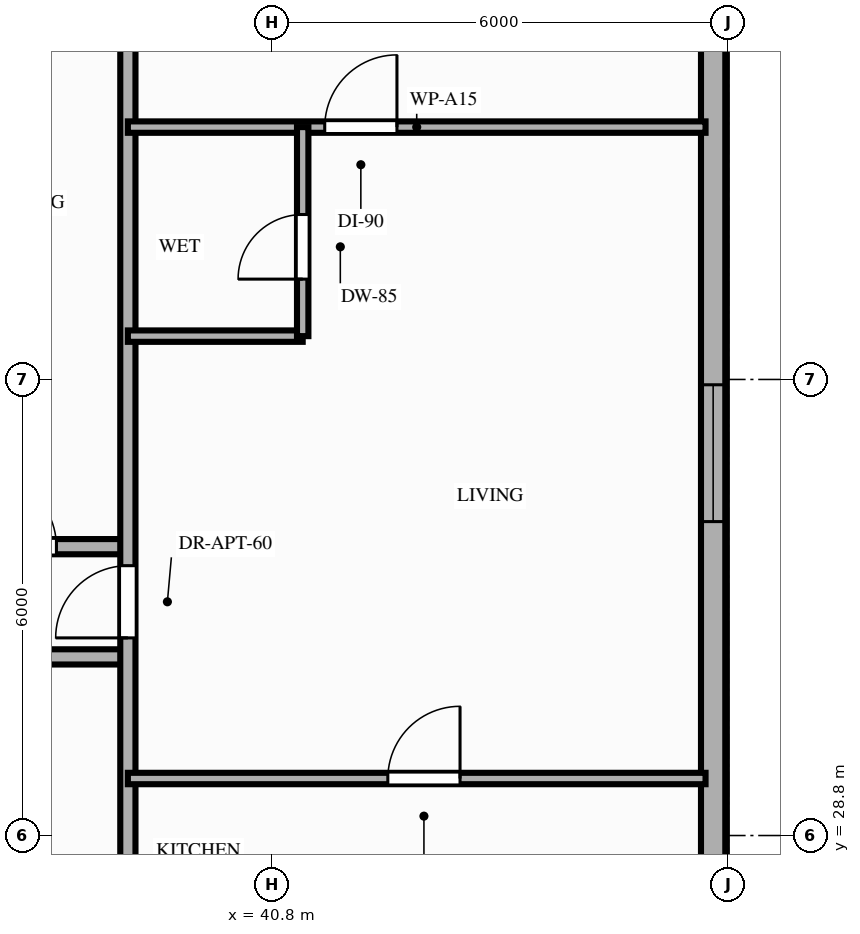
"""IFC4 building model, lengths in metres.
Left out: names, types, materials, properties, quantities, classifications, styles, units other than length and angle.
Written with IfcOpenShell. Run it as: python <this file> out.ifc"""

import sys

from ifc_helpers import new_model, si_unit, direction, frame, frame_2d, origin, place, context, subcontext, project, spatial, rectangle, extrude, element, fill, save


model = new_model("IFC4")
c1 = context("Model", 3, precision=1e-05, world=origin(), true_north=direction((0.0, 1.0)))
c2 = subcontext(c1, "Body", "Model", "MODEL_VIEW")
j1 = project(units=[si_unit("LENGTHUNIT", "METRE"), si_unit("PLANEANGLEUNIT", "RADIAN")], contexts=[c1])
p1 = place(None, origin())
s1 = spatial("IfcSite", under=j1, at=p1, CompositionType="ELEMENT")
p2 = place(p1, origin())
s2 = spatial("IfcBuilding", under=s1, at=p2, CompositionType="ELEMENT")
p3 = place(p2, frame((0.0, 0.0, 93.0)))
s3 = spatial("IfcBuildingStorey", under=s2, at=p3, CompositionType="ELEMENT", Elevation=93.0)
p4 = place(p3, frame((46.6, 26.8, 0.0), z_axis=(0.0, 0.0, 1.0), x_axis=(0.0, 1.0, 0.0)))
e1 = element("IfcWall", 1, at=p4, inside=s3, PredefinedType="STANDARD", context=c2, shape_type="SweptSolid", body=[
    extrude(rectangle(XDim=15.35, YDim=0.32, at=frame_2d((7.675, 0.0))), origin(), (0.0, 0.0, 1.0), 3.02),
])
p5 = place(p4, frame((6.13, 0.0, 0.85)))
e2 = element("IfcOpeningElement", 2, at=p5, cuts=e1, PredefinedType="OPENING", context=c2, shape_type="SweptSolid", body=[
    extrude(rectangle(XDim=1.8, YDim=1.75, at=frame_2d((0.9, 0.875))), frame((0.0, 0.17, 0.0), z_axis=(0.0, -1.0, 0.0), x_axis=(1.0, 0.0, 0.0)), (0.0, 0.0, 1.0), 0.34),
])
p6 = place(p3, frame((27.15, 31.15, 0.0), z_axis=(0.0, 0.0, 1.0), x_axis=(1.0, 0.0, 0.0)))
e3 = element("IfcWall", 3, at=p6, inside=s3, PredefinedType="PARTITIONING", context=c2, shape_type="SweptSolid", body=[
    extrude(rectangle(XDim=11.75, YDim=0.2, at=frame_2d((5.875, 0.0))), origin(), (0.0, 0.0, 1.0), 2.41),
])
p7 = place(p6, frame((5.39, 0.0, 0.0)))
e4 = element("IfcOpeningElement", 4, at=p7, cuts=e3, PredefinedType="OPENING", context=c2, shape_type="SweptSolid", body=[
    extrude(rectangle(XDim=0.95, YDim=2.15, at=frame_2d((0.475, 1.075))), frame((0.0, 0.11, 0.0), z_axis=(0.0, -1.0, 0.0), x_axis=(1.0, 0.0, 0.0)), (0.0, 0.0, 1.0), 0.22),
])
p8 = place(p3, frame((27.15, 32.6, 0.0), z_axis=(0.0, 0.0, 1.0), x_axis=(1.0, 0.0, 0.0)))
e5 = element("IfcWall", 5, at=p8, inside=s3, PredefinedType="PARTITIONING", context=c2, shape_type="SweptSolid", body=[
    extrude(rectangle(XDim=11.75, YDim=0.2, at=frame_2d((5.875, 0.0))), origin(), (0.0, 0.0, 1.0), 2.41),
])
p9 = place(p8, frame((1.17, 0.0, 0.0)))
e6 = element("IfcOpeningElement", 6, at=p9, cuts=e5, PredefinedType="OPENING", context=c2, shape_type="SweptSolid", body=[
    extrude(rectangle(XDim=0.95, YDim=2.15, at=frame_2d((0.475, 1.075))), frame((0.0, 0.11, 0.0), z_axis=(0.0, -1.0, 0.0), x_axis=(1.0, 0.0, 0.0)), (0.0, 0.0, 1.0), 0.22),
])
p10 = place(p8, frame((4.1, 0.0, 0.0)))
e7 = element("IfcOpeningElement", 7, at=p10, cuts=e5, PredefinedType="OPENING", context=c2, shape_type="SweptSolid", body=[
    extrude(rectangle(XDim=0.95, YDim=2.15, at=frame_2d((0.475, 1.075))), frame((0.0, 0.11, 0.0), z_axis=(0.0, -1.0, 0.0), x_axis=(1.0, 0.0, 0.0)), (0.0, 0.0, 1.0), 0.22),
])
p11 = place(p8, frame((6.92, 0.0, 0.0)))
e8 = element("IfcOpeningElement", 8, at=p11, cuts=e5, PredefinedType="OPENING", context=c2, shape_type="SweptSolid", body=[
    extrude(rectangle(XDim=0.95, YDim=2.15, at=frame_2d((0.475, 1.075))), frame((0.0, 0.11, 0.0), z_axis=(0.0, -1.0, 0.0), x_axis=(1.0, 0.0, 0.0)), (0.0, 0.0, 1.0), 0.22),
])
p12 = place(p8, frame((9.86, 0.0, 0.0)))
e9 = element("IfcOpeningElement", 9, at=p12, cuts=e5, PredefinedType="OPENING", context=c2, shape_type="SweptSolid", body=[
    extrude(rectangle(XDim=0.95, YDim=2.15, at=frame_2d((0.475, 1.075))), frame((0.0, 0.11, 0.0), z_axis=(0.0, -1.0, 0.0), x_axis=(1.0, 0.0, 0.0)), (0.0, 0.0, 1.0), 0.22),
])
p13 = place(p3, frame((38.9, 26.75, 0.0), z_axis=(0.0, 0.0, 1.0), x_axis=(0.0, 1.0, 0.0)))
e10 = element("IfcWall", 10, at=p13, inside=s3, PredefinedType="PARTITIONING", context=c2, shape_type="SweptSolid", body=[
    extrude(rectangle(XDim=15.45, YDim=0.2, at=frame_2d((7.725, 0.0))), origin(), (0.0, 0.0, 1.0), 2.41),
])
p14 = place(p13, frame((4.65, 0.0, 0.0)))
e11 = element("IfcOpeningElement", 11, at=p14, cuts=e10, PredefinedType="OPENING", context=c2, shape_type="SweptSolid", body=[
    extrude(rectangle(XDim=0.95, YDim=2.15, at=frame_2d((0.475, 1.075))), frame((0.0, 0.11, 0.0), z_axis=(0.0, -1.0, 0.0), x_axis=(1.0, 0.0, 0.0)), (0.0, 0.0, 1.0), 0.22),
])
p15 = place(p3, frame((38.9, 29.55, 0.0), z_axis=(0.0, 0.0, 1.0), x_axis=(1.0, 0.0, 0.0)))
e12 = element("IfcWall", 12, at=p15, inside=s3, PredefinedType="PARTITIONING", context=c2, shape_type="SweptSolid", body=[
    extrude(rectangle(XDim=7.6, YDim=0.15, at=frame_2d((3.8, 0.0))), origin(), (0.0, 0.0, 1.0), 2.41),
])
p16 = place(p15, frame((3.42, 0.0, 0.0)))
e13 = element("IfcOpeningElement", 13, at=p16, cuts=e12, PredefinedType="OPENING", context=c2, shape_type="SweptSolid", body=[
    extrude(rectangle(XDim=0.95, YDim=2.15, at=frame_2d((0.475, 1.075))), frame((0.0, 0.085, 0.0), z_axis=(0.0, -1.0, 0.0), x_axis=(1.0, 0.0, 0.0)), (0.0, 0.0, 1.0), 0.17),
])
p17 = place(p3, frame((38.9, 38.12, 0.0), z_axis=(0.0, 0.0, 1.0), x_axis=(1.0, 0.0, 0.0)))
e14 = element("IfcWall", 14, at=p17, inside=s3, PredefinedType="PARTITIONING", context=c2, shape_type="SweptSolid", body=[
    extrude(rectangle(XDim=7.6, YDim=0.15, at=frame_2d((3.8, 0.0))), origin(), (0.0, 0.0, 1.0), 2.41),
])
p18 = place(p17, frame((2.59, 0.0, 0.0)))
e15 = element("IfcOpeningElement", 15, at=p18, cuts=e14, PredefinedType="OPENING", context=c2, shape_type="SweptSolid", body=[
    extrude(rectangle(XDim=0.95, YDim=2.15, at=frame_2d((0.475, 1.075))), frame((0.0, 0.085, 0.0), z_axis=(0.0, -1.0, 0.0), x_axis=(1.0, 0.0, 0.0)), (0.0, 0.0, 1.0), 0.17),
])
p19 = place(p3, frame((38.9, 35.37, 0.0), z_axis=(0.0, 0.0, 1.0), x_axis=(1.0, 0.0, 0.0)))
e16 = element("IfcWall", 16, at=p19, inside=s3, PredefinedType="PARTITIONING", context=c2, shape_type="SweptSolid", body=[
    extrude(rectangle(XDim=2.3, YDim=0.15, at=frame_2d((1.15, 0.0))), origin(), (0.0, 0.0, 1.0), 2.41),
])
p20 = place(p3, frame((41.2, 35.37, 0.0), z_axis=(0.0, 0.0, 1.0), x_axis=(0.0, 1.0, 0.0)))
e17 = element("IfcWall", 17, at=p20, inside=s3, PredefinedType="PARTITIONING", context=c2, shape_type="SweptSolid", body=[
    extrude(rectangle(XDim=2.75, YDim=0.15, at=frame_2d((1.375, 0.0))), origin(), (0.0, 0.0, 1.0), 2.41),
])
p21 = place(p20, frame((0.75, 0.0, 0.0)))
e18 = element("IfcOpeningElement", 18, at=p21, cuts=e17, PredefinedType="OPENING", context=c2, shape_type="SweptSolid", body=[
    extrude(rectangle(XDim=0.85, YDim=2.1, at=frame_2d((0.425, 1.05))), frame((0.0, 0.085, 0.0), z_axis=(0.0, -1.0, 0.0), x_axis=(1.0, 0.0, 0.0)), (0.0, 0.0, 1.0), 0.17),
])
p22 = place(p5, origin())
e19 = element("IfcWindow", 19, at=p22, inside=s3, PartitioningType="SINGLE_PANEL", PredefinedType="WINDOW", context=c2, shape_type="SweptSolid", body=[
    extrude(rectangle(XDim=1.8, YDim=1.75, at=frame_2d((0.9, 0.875))), frame((0.0, 0.03, 0.0), z_axis=(0.0, -1.0, 0.0), x_axis=(1.0, 0.0, 0.0)), (0.0, 0.0, 1.0), 0.06),
])
fill(e2, e19)
p23 = place(p14, origin())
e20 = element("IfcDoor", 20, at=p23, inside=s3, OperationType="SINGLE_SWING_LEFT", PredefinedType="DOOR", context=c2, shape_type="SweptSolid", body=[
    extrude(rectangle(XDim=0.95, YDim=2.15, at=frame_2d((0.475, 1.075))), frame((0.0, 0.025, 0.0), z_axis=(0.0, -1.0, 0.0), x_axis=(1.0, 0.0, 0.0)), (0.0, 0.0, 1.0), 0.05),
])
fill(e11, e20)
p24 = place(p18, origin())
e21 = element("IfcDoor", 21, at=p24, inside=s3, OperationType="SINGLE_SWING_RIGHT", PredefinedType="DOOR", context=c2, shape_type="SweptSolid", body=[
    extrude(rectangle(XDim=0.95, YDim=2.15, at=frame_2d((0.475, 1.075))), frame((0.0, 0.025, 0.0), z_axis=(0.0, -1.0, 0.0), x_axis=(1.0, 0.0, 0.0)), (0.0, 0.0, 1.0), 0.05),
])
fill(e15, e21)
p25 = place(p21, origin())
e22 = element("IfcDoor", 22, at=p25, inside=s3, OperationType="SINGLE_SWING_LEFT", PredefinedType="DOOR", context=c2, shape_type="SweptSolid", body=[
    extrude(rectangle(XDim=0.85, YDim=2.1, at=frame_2d((0.425, 1.05))), frame((0.0, 0.025, 0.0), z_axis=(0.0, -1.0, 0.0), x_axis=(1.0, 0.0, 0.0)), (0.0, 0.0, 1.0), 0.05),
])
fill(e18, e22)
p26 = place(p16, origin())
e23 = element("IfcDoor", 23, at=p26, inside=s3, OperationType="SINGLE_SWING_RIGHT", PredefinedType="DOOR", context=c2, shape_type="SweptSolid", body=[
    extrude(rectangle(XDim=0.95, YDim=2.15, at=frame_2d((0.475, 1.075))), frame((0.0, 0.025, 0.0), z_axis=(0.0, -1.0, 0.0), x_axis=(1.0, 0.0, 0.0)), (0.0, 0.0, 1.0), 0.05),
])
fill(e13, e23)
p27 = place(p12, origin())
e24 = element("IfcDoor", 24, at=p27, inside=s3, OperationType="SINGLE_SWING_LEFT", PredefinedType="DOOR", context=c2, shape_type="SweptSolid", body=[
    extrude(rectangle(XDim=0.95, YDim=2.15, at=frame_2d((0.475, 1.075))), frame((0.0, 0.025, 0.0), z_axis=(0.0, -1.0, 0.0), x_axis=(1.0, 0.0, 0.0)), (0.0, 0.0, 1.0), 0.05),
])
fill(e9, e24)
save(model, sys.argv[1])
